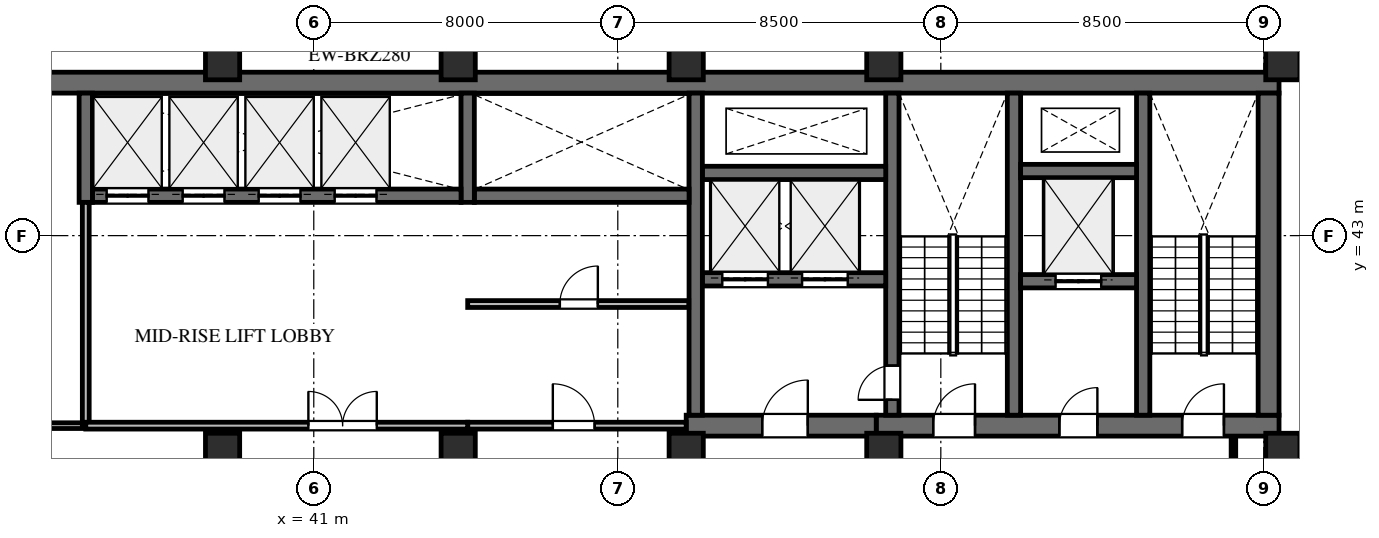
"""IFC4 building model, lengths in metres.
Left out: names, types, materials, properties, quantities, classifications, styles, units other than length and angle.
Written with IfcOpenShell. Run it as: python <this file> out.ifc"""

import sys

from ifc_helpers import new_model, si_unit, direction, frame, frame_2d, origin, origin_2d, place, context, subcontext, project, spatial, rectangle, extrude, element, fill, save


model = new_model("IFC4")
c1 = context("Model", 3, precision=1e-05, world=origin(), true_north=direction((0.0, 1.0)))
c2 = subcontext(c1, "Body", "Model", "MODEL_VIEW")
j1 = project(units=[si_unit("LENGTHUNIT", "METRE"), si_unit("PLANEANGLEUNIT", "RADIAN")], contexts=[c1])
p1 = place(None, origin())
s1 = spatial("IfcSite", under=j1, at=p1, CompositionType="ELEMENT")
p2 = place(p1, origin())
s2 = spatial("IfcBuilding", under=s1, at=p2, CompositionType="ELEMENT")
p3 = place(p2, frame((0.0, 0.0, 204.5)))
s3 = spatial("IfcBuildingStorey", under=s2, at=p3, CompositionType="ELEMENT", Elevation=204.5)
p4 = place(p3, frame((22.9, 47.025, 0.0), z_axis=(0.0, 0.0, 1.0), x_axis=(1.0, 0.0, 0.0)))
e1 = element("IfcWall", 1, at=p4, inside=s3, PredefinedType="SHEAR", context=c2, shape_type="SweptSolid", body=[
    extrude(rectangle(XDim=43.5, YDim=0.55, at=frame_2d((21.75, 0.0))), origin(), (0.0, 0.0, 1.0), 4.0),
])
p5 = place(p3, frame((55.8, 38.0, 0.0), z_axis=(0.0, 0.0, 1.0), x_axis=(1.0, 0.0, 0.0)))
e2 = element("IfcWall", 2, at=p5, inside=s3, PredefinedType="SHEAR", context=c2, shape_type="SweptSolid", body=[
    extrude(rectangle(XDim=10.6, YDim=0.55, at=frame_2d((5.3, 0.0))), origin(), (0.0, 0.0, 1.0), 4.0),
])
p6 = place(p5, frame((1.5, 0.0, 0.0)))
e3 = element("IfcOpeningElement", 3, at=p6, cuts=e2, PredefinedType="OPENING", context=c2, shape_type="SweptSolid", body=[
    extrude(rectangle(XDim=1.1, YDim=2.2, at=frame_2d((0.55, 1.1))), frame((0.0, 0.285, 0.0), z_axis=(0.0, -1.0, 0.0), x_axis=(1.0, 0.0, 0.0)), (0.0, 0.0, 1.0), 0.57),
])
p7 = place(p5, frame((4.82, 0.0, 0.0)))
e4 = element("IfcOpeningElement", 4, at=p7, cuts=e2, PredefinedType="OPENING", context=c2, shape_type="SweptSolid", body=[
    extrude(rectangle(XDim=1.0, YDim=2.15, at=frame_2d((0.5, 1.075))), frame((0.0, 0.285, 0.0), z_axis=(0.0, -1.0, 0.0), x_axis=(1.0, 0.0, 0.0)), (0.0, 0.0, 1.0), 0.57),
])
p8 = place(p5, frame((8.05, 0.0, 0.0)))
e5 = element("IfcOpeningElement", 5, at=p8, cuts=e2, PredefinedType="OPENING", context=c2, shape_type="SweptSolid", body=[
    extrude(rectangle(XDim=1.1, YDim=2.2, at=frame_2d((0.55, 1.1))), frame((0.0, 0.285, 0.0), z_axis=(0.0, -1.0, 0.0), x_axis=(1.0, 0.0, 0.0)), (0.0, 0.0, 1.0), 0.57),
])
p9 = place(p3, frame((66.125, 38.275, 0.0), z_axis=(0.0, 0.0, 1.0), x_axis=(0.0, 1.0, 0.0)))
e6 = element("IfcWall", 6, at=p9, inside=s3, PredefinedType="SHEAR", context=c2, shape_type="SweptSolid", body=[
    extrude(rectangle(XDim=8.475, YDim=0.55, at=frame_2d((4.238, 0.0))), origin(), (0.0, 0.0, 1.0), 4.0),
])
for number, where, z_axis, x_axis in (
    (7, (62.825, 38.275, 0.0), (0.0, 0.0, 1.0), (0.0, 1.0, 0.0)),
    (8, (59.425, 38.275, 0.0), (0.0, 0.0, 1.0), (0.0, 1.0, 0.0)),
):
    element("IfcWall", number, at=place(p3, frame(where, z_axis=z_axis, x_axis=x_axis)), inside=s3, PredefinedType="SHEAR", context=c2, shape_type="SweptSolid", body=[
        extrude(rectangle(XDim=8.475, YDim=0.35, at=frame_2d((4.238, 0.0))), origin(), (0.0, 0.0, 1.0), 4.0),
    ])
p10 = place(p3, frame((56.225, 38.275, 0.0), z_axis=(0.0, 0.0, 1.0), x_axis=(0.0, 1.0, 0.0)))
e9 = element("IfcWall", 9, at=p10, inside=s3, PredefinedType="SHEAR", context=c2, shape_type="SweptSolid", body=[
    extrude(rectangle(XDim=8.475, YDim=0.35, at=frame_2d((4.238, 0.0))), origin(), (0.0, 0.0, 1.0), 4.0),
])
p11 = place(p10, frame((0.405, 0.0, 0.0)))
e10 = element("IfcOpeningElement", 10, at=p11, cuts=e9, PredefinedType="OPENING", context=c2, shape_type="SweptSolid", body=[
    extrude(rectangle(XDim=0.9, YDim=2.15, at=frame_2d((0.45, 1.075))), frame((0.0, 0.185, 0.0), z_axis=(0.0, -1.0, 0.0), x_axis=(1.0, 0.0, 0.0)), (0.0, 0.0, 1.0), 0.37),
])
p12 = place(p3, frame((59.6, 41.8, 0.0), z_axis=(0.0, 0.0, 1.0), x_axis=(1.0, 0.0, 0.0)))
e11 = element("IfcWall", 11, at=p12, inside=s3, PredefinedType="SHEAR", context=c2, shape_type="SweptSolid", body=[
    extrude(rectangle(XDim=3.05, YDim=0.35, at=frame_2d((1.525, 0.0))), origin(), (0.0, 0.0, 1.0), 4.0),
])
p13 = place(p12, frame((0.92, 0.0, 0.0)))
e12 = element("IfcOpeningElement", 12, at=p13, cuts=e11, PredefinedType="OPENING", context=c2, shape_type="SweptSolid", body=[
    extrude(rectangle(XDim=1.2, YDim=2.2, at=frame_2d((0.6, 1.1))), frame((0.0, 0.185, 0.0), z_axis=(0.0, -1.0, 0.0), x_axis=(1.0, 0.0, 0.0)), (0.0, 0.0, 1.0), 0.37),
])
p14 = place(p3, frame((59.6, 44.7, 0.0), z_axis=(0.0, 0.0, 1.0), x_axis=(1.0, 0.0, 0.0)))
e13 = element("IfcWall", 13, at=p14, inside=s3, PredefinedType="SHEAR", context=c2, shape_type="SweptSolid", body=[
    extrude(rectangle(XDim=3.05, YDim=0.35, at=frame_2d((1.525, 0.0))), origin(), (0.0, 0.0, 1.0), 4.0),
])
p15 = place(p3, frame((50.8, 38.0, 0.0), z_axis=(0.0, 0.0, 1.0), x_axis=(1.0, 0.0, 0.0)))
e14 = element("IfcWall", 14, at=p15, inside=s3, PredefinedType="SHEAR", context=c2, shape_type="SweptSolid", body=[
    extrude(rectangle(XDim=5.0, YDim=0.55, at=frame_2d((2.5, 0.0))), origin(), (0.0, 0.0, 1.0), 4.0),
])
p16 = place(p15, frame((2.0, 0.0, 0.0)))
e15 = element("IfcOpeningElement", 15, at=p16, cuts=e14, PredefinedType="OPENING", context=c2, shape_type="SweptSolid", body=[
    extrude(rectangle(XDim=1.2, YDim=2.2, at=frame_2d((0.6, 1.1))), frame((0.0, 0.285, 0.0), z_axis=(0.0, -1.0, 0.0), x_axis=(1.0, 0.0, 0.0)), (0.0, 0.0, 1.0), 0.57),
])
p17 = place(p3, frame((51.225, 41.85, 0.0), z_axis=(0.0, 0.0, 1.0), x_axis=(1.0, 0.0, 0.0)))
e16 = element("IfcWall", 16, at=p17, inside=s3, PredefinedType="SHEAR", context=c2, shape_type="SweptSolid", body=[
    extrude(rectangle(XDim=4.825, YDim=0.35, at=frame_2d((2.413, 0.0))), origin(), (0.0, 0.0, 1.0), 4.0),
])
p18 = place(p17, frame((0.525, 0.0, 0.0)))
e17 = element("IfcOpeningElement", 17, at=p18, cuts=e16, PredefinedType="OPENING", context=c2, shape_type="SweptSolid", body=[
    extrude(rectangle(XDim=1.2, YDim=2.2, at=frame_2d((0.6, 1.1))), frame((0.0, 0.185, 0.0), z_axis=(0.0, -1.0, 0.0), x_axis=(1.0, 0.0, 0.0)), (0.0, 0.0, 1.0), 0.37),
])
p19 = place(p17, frame((2.625, 0.0, 0.0)))
e18 = element("IfcOpeningElement", 18, at=p19, cuts=e16, PredefinedType="OPENING", context=c2, shape_type="SweptSolid", body=[
    extrude(rectangle(XDim=1.2, YDim=2.2, at=frame_2d((0.6, 1.1))), frame((0.0, 0.185, 0.0), z_axis=(0.0, -1.0, 0.0), x_axis=(1.0, 0.0, 0.0)), (0.0, 0.0, 1.0), 0.37),
])
p20 = place(p3, frame((51.225, 44.65, 0.0), z_axis=(0.0, 0.0, 1.0), x_axis=(1.0, 0.0, 0.0)))
e19 = element("IfcWall", 19, at=p20, inside=s3, PredefinedType="SHEAR", context=c2, shape_type="SweptSolid", body=[
    extrude(rectangle(XDim=4.825, YDim=0.35, at=frame_2d((2.413, 0.0))), origin(), (0.0, 0.0, 1.0), 4.0),
])
p21 = place(p3, frame((51.05, 38.275, 0.0), z_axis=(0.0, 0.0, 1.0), x_axis=(0.0, 1.0, 0.0)))
e20 = element("IfcWall", 20, at=p21, inside=s3, PredefinedType="SHEAR", context=c2, shape_type="SweptSolid", body=[
    extrude(rectangle(XDim=8.475, YDim=0.35, at=frame_2d((4.238, 0.0))), origin(), (0.0, 0.0, 1.0), 4.0),
])
p22 = place(p3, frame((45.225, 44.05, 0.0), z_axis=(0.0, 0.0, 1.0), x_axis=(1.0, 0.0, 0.0)))
e21 = element("IfcWall", 21, at=p22, inside=s3, PredefinedType="SHEAR", context=c2, shape_type="SweptSolid", body=[
    extrude(rectangle(XDim=5.65, YDim=0.35, at=frame_2d((2.825, 0.0))), origin(), (0.0, 0.0, 1.0), 4.0),
])
p23 = place(p3, frame((45.05, 43.875, 0.0), z_axis=(0.0, 0.0, 1.0), x_axis=(0.0, 1.0, 0.0)))
e22 = element("IfcWall", 22, at=p23, inside=s3, PredefinedType="SHEAR", context=c2, shape_type="SweptSolid", body=[
    extrude(rectangle(XDim=2.875, YDim=0.35, at=frame_2d((1.438, 0.0))), origin(), (0.0, 0.0, 1.0), 4.0),
])
p24 = place(p3, frame((35.175, 44.05, 0.0), z_axis=(0.0, 0.0, 1.0), x_axis=(1.0, 0.0, 0.0)))
e23 = element("IfcWall", 23, at=p24, inside=s3, PredefinedType="SHEAR", context=c2, shape_type="SweptSolid", body=[
    extrude(rectangle(XDim=9.7, YDim=0.35, at=frame_2d((4.85, 0.0))), origin(), (0.0, 0.0, 1.0), 4.0),
])
p25 = place(p24, frame((0.375, 0.0, 0.0)))
e24 = element("IfcOpeningElement", 24, at=p25, cuts=e23, PredefinedType="OPENING", context=c2, shape_type="SweptSolid", body=[
    extrude(rectangle(XDim=1.1, YDim=2.2, at=frame_2d((0.55, 1.1))), frame((0.0, 0.185, 0.0), z_axis=(0.0, -1.0, 0.0), x_axis=(1.0, 0.0, 0.0)), (0.0, 0.0, 1.0), 0.37),
])
p26 = place(p24, frame((2.375, 0.0, 0.0)))
e25 = element("IfcOpeningElement", 25, at=p26, cuts=e23, PredefinedType="OPENING", context=c2, shape_type="SweptSolid", body=[
    extrude(rectangle(XDim=1.1, YDim=2.2, at=frame_2d((0.55, 1.1))), frame((0.0, 0.185, 0.0), z_axis=(0.0, -1.0, 0.0), x_axis=(1.0, 0.0, 0.0)), (0.0, 0.0, 1.0), 0.37),
])
p27 = place(p24, frame((4.375, 0.0, 0.0)))
e26 = element("IfcOpeningElement", 26, at=p27, cuts=e23, PredefinedType="OPENING", context=c2, shape_type="SweptSolid", body=[
    extrude(rectangle(XDim=1.1, YDim=2.2, at=frame_2d((0.55, 1.1))), frame((0.0, 0.185, 0.0), z_axis=(0.0, -1.0, 0.0), x_axis=(1.0, 0.0, 0.0)), (0.0, 0.0, 1.0), 0.37),
])
p28 = place(p24, frame((6.375, 0.0, 0.0)))
e27 = element("IfcOpeningElement", 27, at=p28, cuts=e23, PredefinedType="OPENING", context=c2, shape_type="SweptSolid", body=[
    extrude(rectangle(XDim=1.1, YDim=2.2, at=frame_2d((0.55, 1.1))), frame((0.0, 0.185, 0.0), z_axis=(0.0, -1.0, 0.0), x_axis=(1.0, 0.0, 0.0)), (0.0, 0.0, 1.0), 0.37),
])
p29 = place(p3, frame((35.0, 43.875, 0.0), z_axis=(0.0, 0.0, 1.0), x_axis=(0.0, 1.0, 0.0)))
e28 = element("IfcWall", 28, at=p29, inside=s3, PredefinedType="SHEAR", context=c2, shape_type="SweptSolid", body=[
    extrude(rectangle(XDim=2.875, YDim=0.35, at=frame_2d((1.438, 0.0))), origin(), (0.0, 0.0, 1.0), 4.0),
])
for number, where, z_axis, x_axis in (
    (29, (66.5, 47.55, 0.0), (0.0, 0.0, 1.0), (1.0, 0.0, 0.0)),
    (30, (56.0, 47.55, 0.0), (0.0, 0.0, 1.0), (1.0, 0.0, 0.0)),
    (31, (66.5, 37.35, 0.0), (0.0, 0.0, 1.0), (1.0, 0.0, 0.0)),
    (32, (56.0, 37.35, 0.0), (0.0, 0.0, 1.0), (1.0, 0.0, 0.0)),
    (33, (50.8, 47.55, 0.0), (0.0, 0.0, 1.0), (1.0, 0.0, 0.0)),
    (34, (50.8, 37.35, 0.0), (0.0, 0.0, 1.0), (1.0, 0.0, 0.0)),
    (35, (44.8, 37.35, 0.0), (0.0, 0.0, 1.0), (1.0, 0.0, 0.0)),
    (36, (44.8, 47.55, 0.0), (0.0, 0.0, 1.0), (1.0, 0.0, 0.0)),
    (37, (38.6, 37.35, 0.0), (0.0, 0.0, 1.0), (1.0, 0.0, 0.0)),
    (38, (38.6, 47.55, 0.0), (0.0, 0.0, 1.0), (1.0, 0.0, 0.0)),
):
    element("IfcColumn", number, at=place(p3, frame(where, z_axis=z_axis, x_axis=x_axis)), inside=s3, PredefinedType="COLUMN", context=c2, shape_type="SweptSolid", body=[
        extrude(rectangle(XDim=0.9, YDim=0.9, at=origin_2d()), origin(), (0.0, 0.0, 1.0), 4.0),
    ])
p30 = place(p3, frame((68.375, 37.8, 0.0), z_axis=(0.0, 0.0, 1.0), x_axis=(-0.139173290738, -0.99026804207, 0.0)))
e39 = element("IfcWall", 39, at=p30, inside=s3, PredefinedType="STANDARD", context=c2, shape_type="SweptSolid", body=[
    extrude(rectangle(XDim=24.498, YDim=0.28, at=frame_2d((12.249, 0.0))), origin(), (0.0, 0.0, 1.0), 3.755),
])
p31 = place(p30, frame((8.077, 0.0, 0.0)))
e40 = element("IfcOpeningElement", 40, at=p31, cuts=e39, PredefinedType="OPENING", context=c2, shape_type="SweptSolid", body=[
    extrude(rectangle(XDim=1.0, YDim=2.15, at=frame_2d((0.5, 1.075))), frame((0.0, 0.15, 0.0), z_axis=(0.0, -1.0, 0.0), x_axis=(1.0, 0.0, 0.0)), (0.0, 0.0, 1.0), 0.3),
])
p32 = place(p30, frame((3.869, 0.0, 0.65)))
e41 = element("IfcOpeningElement", 41, at=p32, cuts=e39, PredefinedType="OPENING", context=c2, shape_type="SweptSolid", body=[
    extrude(rectangle(XDim=1.8, YDim=2.1, at=frame_2d((0.9, 1.05))), frame((0.0, 0.15, 0.0), z_axis=(0.0, -1.0, 0.0), x_axis=(1.0, 0.0, 0.0)), (0.0, 0.0, 1.0), 0.3),
])
p33 = place(p30, frame((15.571, 0.0, 0.65)))
e42 = element("IfcOpeningElement", 42, at=p33, cuts=e39, PredefinedType="OPENING", context=c2, shape_type="SweptSolid", body=[
    extrude(rectangle(XDim=1.8, YDim=2.1, at=frame_2d((0.9, 1.05))), frame((0.0, 0.15, 0.0), z_axis=(0.0, -1.0, 0.0), x_axis=(1.0, 0.0, 0.0)), (0.0, 0.0, 1.0), 0.3),
])
p34 = place(p3, frame((45.05, 38.0, 0.0), z_axis=(0.0, 0.0, 1.0), x_axis=(1.0, 0.0, 0.0)))
e43 = element("IfcWall", 43, at=p34, inside=s3, PredefinedType="STANDARD", context=c2, shape_type="SweptSolid", body=[
    extrude(rectangle(XDim=5.75, YDim=0.18, at=frame_2d((2.875, 0.0))), origin(), (0.0, 0.0, 1.0), 2.982),
])
p35 = place(p34, frame((2.24, 0.0, 0.0)))
e44 = element("IfcOpeningElement", 44, at=p35, cuts=e43, PredefinedType="OPENING", context=c2, shape_type="SweptSolid", body=[
    extrude(rectangle(XDim=1.1, YDim=2.2, at=frame_2d((0.55, 1.1))), frame((0.0, 0.1, 0.0), z_axis=(0.0, -1.0, 0.0), x_axis=(1.0, 0.0, 0.0)), (0.0, 0.0, 1.0), 0.2),
])
p36 = place(p3, frame((45.05, 41.2, 0.0), z_axis=(0.0, 0.0, 1.0), x_axis=(1.0, 0.0, 0.0)))
e45 = element("IfcWall", 45, at=p36, inside=s3, PredefinedType="STANDARD", context=c2, shape_type="SweptSolid", body=[
    extrude(rectangle(XDim=5.817, YDim=0.18, at=frame_2d((2.908, 0.0))), origin(), (0.0, 0.0, 1.0), 2.982),
])
p37 = place(p36, frame((2.425, 0.0, 0.0)))
e46 = element("IfcOpeningElement", 46, at=p37, cuts=e45, PredefinedType="OPENING", context=c2, shape_type="SweptSolid", body=[
    extrude(rectangle(XDim=1.0, YDim=2.15, at=frame_2d((0.5, 1.075))), frame((0.0, 0.1, 0.0), z_axis=(0.0, -1.0, 0.0), x_axis=(1.0, 0.0, 0.0)), (0.0, 0.0, 1.0), 0.2),
])
p38 = place(p3, frame((27.05, 38.0, 0.0), z_axis=(0.0, 0.0, 1.0), x_axis=(1.0, 0.0, 0.0)))
e47 = element("IfcWall", 47, at=p38, inside=s3, PredefinedType="PARTITIONING", context=c2, shape_type="SweptSolid", body=[
    extrude(rectangle(XDim=7.95, YDim=0.15, at=frame_2d((3.975, 0.0))), origin(), (0.0, 0.0, 1.0), 2.982),
])
p39 = place(p38, frame((2.175, 0.0, 0.0)))
e48 = element("IfcOpeningElement", 48, at=p39, cuts=e47, PredefinedType="OPENING", context=c2, shape_type="SweptSolid", body=[
    extrude(rectangle(XDim=1.05, YDim=2.2, at=frame_2d((0.525, 1.1))), frame((0.0, 0.085, 0.0), z_axis=(0.0, -1.0, 0.0), x_axis=(1.0, 0.0, 0.0)), (0.0, 0.0, 1.0), 0.17),
])
p40 = place(p3, frame((35.0, 38.0, 0.0), z_axis=(0.0, 0.0, 1.0), x_axis=(0.0, 1.0, 0.0)))
e49 = element("IfcWall", 49, at=p40, inside=s3, PredefinedType="STANDARD", context=c2, shape_type="SweptSolid", body=[
    extrude(rectangle(XDim=5.875, YDim=0.18, at=frame_2d((2.938, 0.0))), origin(), (0.0, 0.0, 1.0), 3.755),
])
p41 = place(p3, frame((35.0, 38.0, 0.0), z_axis=(0.0, 0.0, 1.0), x_axis=(1.0, 0.0, 0.0)))
e50 = element("IfcWall", 50, at=p41, inside=s3, PredefinedType="STANDARD", context=c2, shape_type="SweptSolid", body=[
    extrude(rectangle(XDim=10.05, YDim=0.18, at=frame_2d((5.025, 0.0))), origin(), (0.0, 0.0, 1.0), 2.982),
])
p42 = place(p41, frame((5.858, 0.0, 0.0)))
e51 = element("IfcOpeningElement", 51, at=p42, cuts=e50, PredefinedType="OPENING", context=c2, shape_type="SweptSolid", body=[
    extrude(rectangle(XDim=1.8, YDim=2.2, at=frame_2d((0.9, 1.1))), frame((0.0, 0.1, 0.0), z_axis=(0.0, -1.0, 0.0), x_axis=(1.0, 0.0, 0.0)), (0.0, 0.0, 1.0), 0.2),
])
p43 = place(p3, frame((65.2, 34.4, 0.0), z_axis=(0.0, 0.0, 1.0), x_axis=(0.0, 1.0, 0.0)))
e52 = element("IfcWall", 52, at=p43, inside=s3, PredefinedType="PARTITIONING", context=c2, shape_type="SweptSolid", body=[
    extrude(rectangle(XDim=3.317, YDim=0.12, at=frame_2d((1.659, 0.0))), origin(), (0.0, 0.0, 1.0), 2.982),
])
p44 = place(p6, origin())
e53 = element("IfcDoor", 53, at=p44, inside=s3, OperationType="SINGLE_SWING_RIGHT", PredefinedType="DOOR", context=c2, shape_type="SweptSolid", body=[
    extrude(rectangle(XDim=1.1, YDim=2.2, at=frame_2d((0.55, 1.1))), frame((0.0, 0.025, 0.0), z_axis=(0.0, -1.0, 0.0), x_axis=(1.0, 0.0, 0.0)), (0.0, 0.0, 1.0), 0.05),
])
fill(e3, e53)
p45 = place(p7, origin())
e54 = element("IfcDoor", 54, at=p45, inside=s3, OperationType="SINGLE_SWING_RIGHT", PredefinedType="DOOR", context=c2, shape_type="SweptSolid", body=[
    extrude(rectangle(XDim=1.0, YDim=2.15, at=frame_2d((0.5, 1.075))), frame((0.0, 0.025, 0.0), z_axis=(0.0, -1.0, 0.0), x_axis=(1.0, 0.0, 0.0)), (0.0, 0.0, 1.0), 0.05),
])
fill(e4, e54)
p46 = place(p8, origin())
e55 = element("IfcDoor", 55, at=p46, inside=s3, OperationType="SINGLE_SWING_RIGHT", PredefinedType="DOOR", context=c2, shape_type="SweptSolid", body=[
    extrude(rectangle(XDim=1.1, YDim=2.2, at=frame_2d((0.55, 1.1))), frame((0.0, 0.025, 0.0), z_axis=(0.0, -1.0, 0.0), x_axis=(1.0, 0.0, 0.0)), (0.0, 0.0, 1.0), 0.05),
])
fill(e5, e55)
p47 = place(p16, origin())
e56 = element("IfcDoor", 56, at=p47, inside=s3, OperationType="SINGLE_SWING_RIGHT", PredefinedType="DOOR", context=c2, shape_type="SweptSolid", body=[
    extrude(rectangle(XDim=1.2, YDim=2.2, at=frame_2d((0.6, 1.1))), frame((0.0, 0.025, 0.0), z_axis=(0.0, -1.0, 0.0), x_axis=(1.0, 0.0, 0.0)), (0.0, 0.0, 1.0), 0.05),
])
fill(e15, e56)
p48 = place(p11, origin())
e57 = element("IfcDoor", 57, at=p48, inside=s3, OperationType="SINGLE_SWING_LEFT", PredefinedType="DOOR", context=c2, shape_type="SweptSolid", body=[
    extrude(rectangle(XDim=0.9, YDim=2.15, at=frame_2d((0.45, 1.075))), frame((0.0, 0.025, 0.0), z_axis=(0.0, -1.0, 0.0), x_axis=(1.0, 0.0, 0.0)), (0.0, 0.0, 1.0), 0.05),
])
fill(e10, e57)
p49 = place(p25, origin())
e58 = element("IfcDoor", 58, at=p49, inside=s3, OperationType="DOUBLE_DOOR_SLIDING", PredefinedType="DOOR", context=c2, shape_type="SweptSolid", body=[
    extrude(rectangle(XDim=1.1, YDim=2.2, at=frame_2d((0.55, 1.1))), frame((0.0, 0.025, 0.0), z_axis=(0.0, -1.0, 0.0), x_axis=(1.0, 0.0, 0.0)), (0.0, 0.0, 1.0), 0.05),
])
fill(e24, e58)
p50 = place(p26, origin())
e59 = element("IfcDoor", 59, at=p50, inside=s3, OperationType="DOUBLE_DOOR_SLIDING", PredefinedType="DOOR", context=c2, shape_type="SweptSolid", body=[
    extrude(rectangle(XDim=1.1, YDim=2.2, at=frame_2d((0.55, 1.1))), frame((0.0, 0.025, 0.0), z_axis=(0.0, -1.0, 0.0), x_axis=(1.0, 0.0, 0.0)), (0.0, 0.0, 1.0), 0.05),
])
fill(e25, e59)
p51 = place(p27, origin())
e60 = element("IfcDoor", 60, at=p51, inside=s3, OperationType="DOUBLE_DOOR_SLIDING", PredefinedType="DOOR", context=c2, shape_type="SweptSolid", body=[
    extrude(rectangle(XDim=1.1, YDim=2.2, at=frame_2d((0.55, 1.1))), frame((0.0, 0.025, 0.0), z_axis=(0.0, -1.0, 0.0), x_axis=(1.0, 0.0, 0.0)), (0.0, 0.0, 1.0), 0.05),
])
fill(e26, e60)
p52 = place(p28, origin())
e61 = element("IfcDoor", 61, at=p52, inside=s3, OperationType="DOUBLE_DOOR_SLIDING", PredefinedType="DOOR", context=c2, shape_type="SweptSolid", body=[
    extrude(rectangle(XDim=1.1, YDim=2.2, at=frame_2d((0.55, 1.1))), frame((0.0, 0.025, 0.0), z_axis=(0.0, -1.0, 0.0), x_axis=(1.0, 0.0, 0.0)), (0.0, 0.0, 1.0), 0.05),
])
fill(e27, e61)
p53 = place(p18, origin())
e62 = element("IfcDoor", 62, at=p53, inside=s3, OperationType="DOUBLE_DOOR_SLIDING", PredefinedType="DOOR", context=c2, shape_type="SweptSolid", body=[
    extrude(rectangle(XDim=1.2, YDim=2.2, at=frame_2d((0.6, 1.1))), frame((0.0, 0.025, 0.0), z_axis=(0.0, -1.0, 0.0), x_axis=(1.0, 0.0, 0.0)), (0.0, 0.0, 1.0), 0.05),
])
fill(e17, e62)
p54 = place(p19, origin())
e63 = element("IfcDoor", 63, at=p54, inside=s3, OperationType="DOUBLE_DOOR_SLIDING", PredefinedType="DOOR", context=c2, shape_type="SweptSolid", body=[
    extrude(rectangle(XDim=1.2, YDim=2.2, at=frame_2d((0.6, 1.1))), frame((0.0, 0.025, 0.0), z_axis=(0.0, -1.0, 0.0), x_axis=(1.0, 0.0, 0.0)), (0.0, 0.0, 1.0), 0.05),
])
fill(e18, e63)
p55 = place(p13, origin())
e64 = element("IfcDoor", 64, at=p55, inside=s3, OperationType="DOUBLE_DOOR_SLIDING", PredefinedType="DOOR", context=c2, shape_type="SweptSolid", body=[
    extrude(rectangle(XDim=1.2, YDim=2.2, at=frame_2d((0.6, 1.1))), frame((0.0, 0.025, 0.0), z_axis=(0.0, -1.0, 0.0), x_axis=(1.0, 0.0, 0.0)), (0.0, 0.0, 1.0), 0.05),
])
fill(e12, e64)
p56 = place(p37, origin())
e65 = element("IfcDoor", 65, at=p56, inside=s3, OperationType="SINGLE_SWING_RIGHT", PredefinedType="DOOR", context=c2, shape_type="SweptSolid", body=[
    extrude(rectangle(XDim=1.0, YDim=2.15, at=frame_2d((0.5, 1.075))), frame((0.0, 0.025, 0.0), z_axis=(0.0, -1.0, 0.0), x_axis=(1.0, 0.0, 0.0)), (0.0, 0.0, 1.0), 0.05),
])
fill(e46, e65)
p57 = place(p35, origin())
e66 = element("IfcDoor", 66, at=p57, inside=s3, OperationType="SINGLE_SWING_LEFT", PredefinedType="DOOR", context=c2, shape_type="SweptSolid", body=[
    extrude(rectangle(XDim=1.1, YDim=2.2, at=frame_2d((0.55, 1.1))), frame((0.0, 0.025, 0.0), z_axis=(0.0, -1.0, 0.0), x_axis=(1.0, 0.0, 0.0)), (0.0, 0.0, 1.0), 0.05),
])
fill(e44, e66)
p58 = place(p42, origin())
e67 = element("IfcDoor", 67, at=p58, inside=s3, OperationType="DOUBLE_DOOR_SINGLE_SWING", PredefinedType="DOOR", context=c2, shape_type="SweptSolid", body=[
    extrude(rectangle(XDim=1.8, YDim=2.2, at=frame_2d((0.9, 1.1))), frame((0.0, 0.025, 0.0), z_axis=(0.0, -1.0, 0.0), x_axis=(1.0, 0.0, 0.0)), (0.0, 0.0, 1.0), 0.05),
])
fill(e51, e67)
save(model, sys.argv[1])
